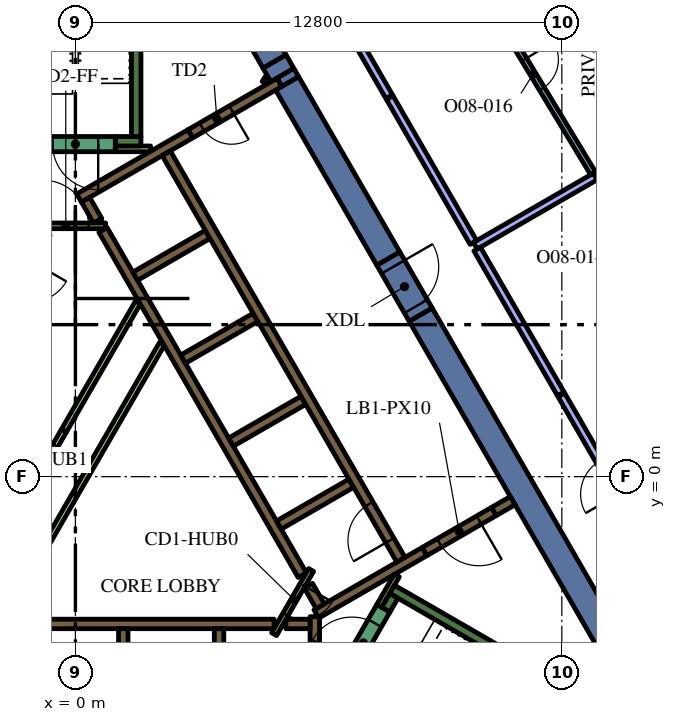
"""IFC4 building model, lengths in metres.
Left out: names, types, materials, properties, quantities, classifications, styles, units other than length and angle.
Written with IfcOpenShell. Run it as: python <this file> out.ifc"""

import sys

from ifc_helpers import new_model, si_unit, direction, frame, frame_2d, origin, place, context, subcontext, project, spatial, polyline, rectangle, outline, extrude, element, fill, save


model = new_model("IFC4")
c1 = context("Model", 3, precision=1e-05, world=origin(), true_north=direction((0.0, 1.0)))
c2 = subcontext(c1, "Body", "Model", "MODEL_VIEW")
j1 = project(units=[si_unit("LENGTHUNIT", "METRE"), si_unit("PLANEANGLEUNIT", "RADIAN")], contexts=[c1])
p1 = place(None, origin())
s1 = spatial("IfcSite", under=j1, at=p1, CompositionType="ELEMENT")
p2 = place(p1, origin())
s2 = spatial("IfcBuilding", under=s1, at=p2, CompositionType="ELEMENT")
p3 = place(p2, frame((0.0, 0.0, 226.8)))
s3 = spatial("IfcBuildingStorey", under=s2, at=p3, CompositionType="ELEMENT", Elevation=226.8)
p4 = place(p3, frame((9.085, 4.264, 0.0), z_axis=(0.0, 0.0, 1.0), x_axis=(0.499998082512, -0.866026510844, 0.0)))
e1 = element("IfcWall", 1, at=p4, inside=s3, PredefinedType="SOLIDWALL", context=c2, shape_type="SweptSolid", body=[
    extrude(rectangle(XDim=12.472, YDim=0.7, at=frame_2d((6.236, 0.0))), origin(), (0.0, 0.0, 1.0), 4.2),
])
p5 = place(p3, frame((5.445, 10.569, 0.0), z_axis=(0.0, 0.0, 1.0), x_axis=(-0.500218351069, 0.865899302029, 0.0)))
e2 = element("IfcWall", 2, at=p5, inside=s3, PredefinedType="SOLIDWALL", context=c2, shape_type="SweptSolid", body=[
    extrude(rectangle(XDim=0.412, YDim=0.7, at=frame_2d((0.206, 0.0))), origin(), (0.0, 0.0, 1.0), 4.2),
])
p6 = place(p3, frame((5.571, 10.35, 0.0), z_axis=(0.0, 0.0, 1.0), x_axis=(0.499968379186, -0.8660436593, 0.0)))
e3 = element("IfcWall", 3, at=p6, inside=s3, PredefinedType="SOLIDWALL", context=c2, shape_type="SweptSolid", body=[
    extrude(rectangle(XDim=5.328, YDim=0.7, at=frame_2d((2.664, 0.0))), origin(), (0.0, 0.0, 1.0), 4.2),
])
p7 = place(p3, origin())
e4 = element("IfcWall", 4, at=p7, inside=s3, PredefinedType="SOLIDWALL", context=c2, shape_type="SweptSolid", body=[
    extrude(outline(polyline([(5.432, 10.272), (5.308, 10.487), (5.749, 10.742), (5.873, 10.527), (5.432, 10.272)])), origin(), (0.0, 0.0, 1.0), 4.2),
])
p8 = place(p3, frame((5.238, 10.927, 0.0), z_axis=(0.0, 0.0, 1.0), x_axis=(-0.499985607887, 0.866033712915, 0.0)))
e5 = element("IfcWall", 5, at=p8, inside=s3, PredefinedType="SOLIDWALL", context=c2, shape_type="SweptSolid", body=[
    extrude(rectangle(XDim=6.478, YDim=0.7, at=frame_2d((3.239, 0.0))), origin(), (0.0, 0.0, 1.0), 4.2),
])
p9 = place(p3, frame((8.334, -2.964, 0.0), z_axis=(0.0, 0.0, 1.0), x_axis=(0.866016039709, -0.500016218704, 0.0)))
e6 = element("IfcWall", 6, at=p9, inside=s3, PredefinedType="SOLIDWALL", context=c2, shape_type="SweptSolid", body=[
    extrude(rectangle(XDim=7.05, YDim=0.25, at=frame_2d((3.525, 0.0))), origin(), (0.0, 0.0, 1.0), 4.2),
])
p10 = place(p3, frame((8.168, -3.503, 0.0), z_axis=(0.0, 0.0, 1.0), x_axis=(0.49972245349, 0.866185586049, 0.0)))
e7 = element("IfcWall", 7, at=p10, inside=s3, PredefinedType="SOLIDWALL", context=c2, shape_type="SweptSolid", body=[
    extrude(rectangle(XDim=0.425, YDim=0.25, at=frame_2d((0.212, 0.0))), origin(), (0.0, 0.0, 1.0), 4.2),
])
p11 = place(p3, frame((1.6, 8.95, 0.0), z_axis=(0.0, 0.0, 1.0), x_axis=(0.0, 1.0, 0.0)))
e8 = element("IfcWall", 8, at=p11, inside=s3, PredefinedType="SOLIDWALL", context=c2, shape_type="SweptSolid", body=[
    extrude(rectangle(XDim=6.8, YDim=0.25, at=frame_2d((3.4, 0.0))), origin(), (0.0, 0.0, 1.0), 4.2),
])
p12 = place(p3, frame((1.05, 8.825, 0.0), z_axis=(0.0, 0.0, 1.0), x_axis=(1.0, 0.0, 0.0)))
e9 = element("IfcWall", 9, at=p12, inside=s3, PredefinedType="SOLIDWALL", context=c2, shape_type="SweptSolid", body=[
    extrude(rectangle(XDim=0.675, YDim=0.25, at=frame_2d((0.337, 0.0))), origin(), (0.0, 0.0, 1.0), 4.2),
])
p13 = place(p3, frame((-5.259, -3.875, 0.0), z_axis=(0.0, 0.0, 1.0), x_axis=(1.0, 0.0, 0.0)))
e10 = element("IfcWall", 10, at=p13, inside=s3, PredefinedType="SOLIDWALL", context=c2, shape_type="SweptSolid", body=[
    extrude(rectangle(XDim=10.489, YDim=0.25, at=frame_2d((5.244, 0.0))), origin(), (0.0, 0.0, 1.0), 4.2),
])
for number, where, z_axis, x_axis in (
    (11, (3.78, -4.0, 0.0), (0.0, 0.0, 1.0), (0.0, -1.0, 0.0)),
    (12, (1.26, -4.0, 0.0), (0.0, 0.0, 1.0), (0.0, -1.0, 0.0)),
):
    element("IfcWall", number, at=place(p3, frame(where, z_axis=z_axis, x_axis=x_axis)), inside=s3, PredefinedType="SOLIDWALL", context=c2, shape_type="SweptSolid", body=[
        extrude(rectangle(XDim=2.2, YDim=0.25, at=frame_2d((1.1, 0.0))), origin(), (0.0, 0.0, 1.0), 4.2),
    ])
p14 = place(p3, frame((6.3, -7.24, 0.0), z_axis=(0.0, 0.0, 1.0), x_axis=(0.0, 1.0, 0.0)))
e13 = element("IfcWall", 13, at=p14, inside=s3, PredefinedType="SOLIDWALL", context=c2, shape_type="SweptSolid", body=[
    extrude(rectangle(XDim=3.556, YDim=0.25, at=frame_2d((1.778, 0.0))), origin(), (0.0, 0.0, 1.0), 4.2),
])
p15 = place(p3, frame((5.538, -3.875, 0.0), z_axis=(0.0, 0.0, 1.0), x_axis=(1.0, 0.0, 0.0)))
e14 = element("IfcWall", 14, at=p15, inside=s3, PredefinedType="SOLIDWALL", context=c2, shape_type="SweptSolid", body=[
    extrude(rectangle(XDim=0.637, YDim=0.25, at=frame_2d((0.318, 0.0))), origin(), (0.0, 0.0, 1.0), 4.2),
])
p16 = place(p3, frame((9.19, -1.969, 0.0), z_axis=(0.0, 0.0, 1.0), x_axis=(-0.866057109641, -0.499945079824, 0.0)))
e15 = element("IfcWall", 15, at=p16, inside=s3, PredefinedType="SOLIDWALL", context=c2, shape_type="SweptSolid", body=[
    extrude(rectangle(XDim=3.291, YDim=0.25, at=frame_2d((1.646, 0.0))), origin(), (0.0, 0.0, 1.0), 4.2),
])
p17 = place(p3, frame((6.13, -2.867, 0.0), z_axis=(0.0, 0.0, 1.0), x_axis=(0.500160776593, -0.865932559475, 0.0)))
e16 = element("IfcWall", 16, at=p17, inside=s3, PredefinedType="SOLIDWALL", context=c2, shape_type="SweptSolid", body=[
    extrude(rectangle(XDim=0.627, YDim=0.25, at=frame_2d((0.313, 0.0))), origin(), (0.0, 0.0, 1.0), 4.2),
])
p18 = place(p3, frame((11.507, -0.631, 0.0), z_axis=(0.0, 0.0, 1.0), x_axis=(-0.866093731455, -0.499881634324, 0.0)))
e17 = element("IfcWall", 17, at=p18, inside=s3, PredefinedType="SOLIDWALL", context=c2, shape_type="SweptSolid", body=[
    extrude(rectangle(XDim=0.575, YDim=0.25, at=frame_2d((0.288, 0.0))), origin(), (0.0, 0.0, 1.0), 4.2),
])
p19 = place(p3, frame((3.028, 9.023, 0.0), z_axis=(0.0, 0.0, 1.0), x_axis=(-0.866036587186, -0.49998062928, 0.0)))
e18 = element("IfcWall", 18, at=p19, inside=s3, PredefinedType="SOLIDWALL", context=c2, shape_type="SweptSolid", body=[
    extrude(rectangle(XDim=3.384, YDim=0.25, at=frame_2d((1.692, 0.0))), origin(), (0.0, 0.0, 1.0), 4.2),
])
p20 = place(p3, frame((0.268, 7.285, 0.0), z_axis=(0.0, 0.0, 1.0), x_axis=(0.500098681536, -0.865968422476, 0.0)))
e19 = element("IfcWall", 19, at=p20, inside=s3, PredefinedType="SOLIDWALL", context=c2, shape_type="SweptSolid", body=[
    extrude(rectangle(XDim=0.636, YDim=0.25, at=frame_2d((0.318, 0.0))), origin(), (0.0, 0.0, 1.0), 4.2),
])
p21 = place(p3, frame((5.97, -2.591, 0.0), z_axis=(0.0, 0.0, 1.0), x_axis=(-0.499994469932, 0.866028596547, 0.0)))
e20 = element("IfcWall", 20, at=p21, inside=s3, PredefinedType="SOLIDWALL", context=c2, shape_type="SweptSolid", body=[
    extrude(rectangle(XDim=10.488, YDim=0.25, at=frame_2d((5.244, 0.0))), origin(), (0.0, 0.0, 1.0), 4.2),
])
p22 = place(p3, frame((1.574, 5.274, 0.0), z_axis=(0.0, 0.0, 1.0), x_axis=(0.866028486751, 0.499994660107, 0.0)))
e21 = element("IfcWall", 21, at=p22, inside=s3, PredefinedType="SOLIDWALL", context=c2, shape_type="SweptSolid", body=[
    extrude(rectangle(XDim=2.2, YDim=0.25, at=frame_2d((1.1, 0.0))), origin(), (0.0, 0.0, 1.0), 4.2),
])
for number, where, z_axis, x_axis in (
    (22, (2.834, 3.091, 0.0), (0.0, 0.0, 1.0), (0.866, 0.5, 0.0)),
    (23, (4.094, 0.909, 0.0), (0.0, 0.0, 1.0), (0.866, 0.5, 0.0)),
    (24, (5.354, -1.274, 0.0), (0.0, 0.0, 1.0), (0.866, 0.5, 0.0)),
):
    element("IfcWall", number, at=place(p3, frame(where, z_axis=z_axis, x_axis=x_axis)), inside=s3, PredefinedType="SOLIDWALL", context=c2, shape_type="SweptSolid", body=[
        extrude(rectangle(XDim=2.2, YDim=0.25, at=frame_2d((1.1, 0.0))), origin(), (0.0, 0.0, 1.0), 4.2),
    ])
p23 = place(p3, frame((1.05, 8.625, 0.0), z_axis=(0.0, 0.0, 1.0), x_axis=(1.0, 0.0, 0.0)))
e25 = element("IfcWall", 25, at=p23, inside=s3, PredefinedType="PARTITIONING", context=c2, shape_type="SweptSolid", body=[
    extrude(rectangle(XDim=0.929, YDim=0.15, at=frame_2d((0.464, 0.0))), origin(), (0.0, 0.0, 1.0), 3.45),
])
p24 = place(p3, frame((4.98, 10.358, 0.0), z_axis=(0.0, 0.0, 1.0), x_axis=(0.500640202437, 0.86565546709, 0.0)))
e26 = element("IfcWall", 26, at=p24, inside=s3, PredefinedType="PARTITIONING", context=c2, shape_type="SweptSolid", body=[
    extrude(rectangle(XDim=0.146, YDim=0.15, at=frame_2d((0.073, 0.0))), origin(), (0.0, 0.0, 1.0), 3.45),
])
p25 = place(p3, frame((8.459, -2.599, 0.0), z_axis=(0.0, 0.0, 1.0), x_axis=(-0.500041054325, -0.866001699761, 0.0)))
e27 = element("IfcWall", 27, at=p25, inside=s3, PredefinedType="PARTITIONING", context=c2, shape_type="SweptSolid", body=[
    extrude(rectangle(XDim=0.929, YDim=0.15, at=frame_2d((0.464, 0.0))), origin(), (0.0, 0.0, 1.0), 4.2),
])
p26 = place(p3, frame((-1.887, -3.718, 0.0), z_axis=(0.0, 0.0, 1.0), x_axis=(0.500005008002, 0.866022512394, 0.0)))
e28 = element("IfcWall", 28, at=p26, inside=s3, PredefinedType="PARTITIONING", context=c2, shape_type="SweptSolid", body=[
    extrude(rectangle(XDim=8.327, YDim=0.15, at=frame_2d((4.164, 0.0))), origin(), (0.0, 0.0, 1.0), 3.45),
])
p27 = place(p3, frame((-0.3, 1.212, 0.0), z_axis=(0.0, 0.0, 1.0), x_axis=(0.499963101113, 0.866046706318, 0.0)))
e29 = element("IfcWall", 29, at=p27, inside=s3, PredefinedType="PARTITIONING", context=c2, shape_type="SweptSolid", body=[
    extrude(rectangle(XDim=3.893, YDim=0.15, at=frame_2d((1.947, 0.0))), origin(), (0.0, 0.0, 1.0), 3.45),
])
p28 = place(p3, frame((8.565, -2.185, 0.0), z_axis=(0.0, 0.0, 1.0), x_axis=(-0.499997954832, 0.866026584559, 0.0)))
e30 = element("IfcWall", 30, at=p28, inside=s3, PredefinedType="SOLIDWALL", context=c2, shape_type="SweptSolid", body=[
    extrude(rectangle(XDim=12.35, YDim=0.25, at=frame_2d((6.175, 0.0))), origin(), (0.0, 0.0, 1.0), 4.2),
])
p29 = place(p28, frame((0.585, 0.0, 0.0)))
e31 = element("IfcOpeningElement", 31, at=p29, cuts=e30, PredefinedType="OPENING", context=c2, shape_type="SweptSolid", body=[
    extrude(rectangle(XDim=1.1, YDim=2.1, at=frame_2d((0.55, 1.05))), frame((0.0, 0.135, 0.0), z_axis=(0.0, -1.0, 0.0), x_axis=(1.0, 0.0, 0.0)), (0.0, 0.0, 1.0), 0.27),
])
p30 = place(p3, frame((7.053, -5.284, 0.0), z_axis=(0.0, 0.0, 1.0), x_axis=(0.500078061341, 0.865980330357, 0.0)))
e32 = element("IfcWall", 32, at=p30, inside=s3, PredefinedType="SOLIDWALL", context=c2, shape_type="SweptSolid", body=[
    extrude(rectangle(XDim=2.1, YDim=0.4, at=frame_2d((1.05, 0.0))), origin(), (0.0, 0.0, 1.0), 4.2),
])
p31 = place(p30, frame((0.45, 0.0, 0.0)))
e33 = element("IfcOpeningElement", 33, at=p31, cuts=e32, PredefinedType="OPENING", context=c2, shape_type="SweptSolid", body=[
    extrude(rectangle(XDim=1.2, YDim=2.1, at=frame_2d((0.6, 1.05))), frame((0.0, 0.21, 0.0), z_axis=(0.0, -1.0, 0.0), x_axis=(1.0, 0.0, 0.0)), (0.0, 0.0, 1.0), 0.42),
])
p32 = place(p3, frame((1.05, 8.75, 0.0), z_axis=(0.0, 0.0, 1.0), x_axis=(-1.0, 0.0, 0.0)))
e34 = element("IfcWall", 34, at=p32, inside=s3, PredefinedType="SOLIDWALL", context=c2, shape_type="SweptSolid", body=[
    extrude(rectangle(XDim=2.1, YDim=0.4, at=frame_2d((1.05, 0.0))), origin(), (0.0, 0.0, 1.0), 4.2),
])
p33 = place(p32, frame((0.45, 0.0, 0.0)))
e35 = element("IfcOpeningElement", 35, at=p33, cuts=e34, PredefinedType="OPENING", context=c2, shape_type="SweptSolid", body=[
    extrude(rectangle(XDim=1.2, YDim=2.1, at=frame_2d((0.6, 1.05))), frame((0.0, 0.21, 0.0), z_axis=(0.0, -1.0, 0.0), x_axis=(1.0, 0.0, 0.0)), (0.0, 0.0, 1.0), 0.42),
])
p34 = place(p3, frame((5.366, 10.373, 0.0), z_axis=(0.0, 0.0, 1.0), x_axis=(-0.866019956843, -0.50000943426, 0.0)))
e36 = element("IfcWall", 36, at=p34, inside=s3, PredefinedType="SOLIDWALL", context=c2, shape_type="SweptSolid", body=[
    extrude(rectangle(XDim=2.7, YDim=0.25, at=frame_2d((1.35, 0.0))), origin(), (0.0, 0.0, 1.0), 4.2),
])
p35 = place(p34, frame((1.45, 0.0, 0.0)))
e37 = element("IfcOpeningElement", 37, at=p35, cuts=e36, PredefinedType="OPENING", context=c2, shape_type="SweptSolid", body=[
    extrude(rectangle(XDim=0.9, YDim=2.1, at=frame_2d((0.45, 1.05))), frame((0.0, 0.135, 0.0), z_axis=(0.0, -1.0, 0.0), x_axis=(1.0, 0.0, 0.0)), (0.0, 0.0, 1.0), 0.27),
])
p36 = place(p3, frame((6.203, -2.456, 0.0), z_axis=(0.0, 0.0, 1.0), x_axis=(-0.500043961785, -0.866000020948, 0.0)))
e38 = element("IfcWall", 38, at=p36, inside=s3, PredefinedType="PARTITIONING", context=c2, shape_type="SweptSolid", body=[
    extrude(rectangle(XDim=1.95, YDim=0.15, at=frame_2d((0.975, 0.0))), origin(), (0.0, 0.0, 1.0), 4.2),
])
p37 = place(p36, frame((0.45, 0.0, 0.0)))
e39 = element("IfcOpeningElement", 39, at=p37, cuts=e38, PredefinedType="OPENING", context=c2, shape_type="SweptSolid", body=[
    extrude(rectangle(XDim=0.9, YDim=2.1, at=frame_2d((0.45, 1.05))), frame((0.0, 0.085, 0.0), z_axis=(0.0, -1.0, 0.0), x_axis=(1.0, 0.0, 0.0)), (0.0, 0.0, 1.0), 0.17),
])
p38 = place(p3, frame((-1.303, 6.6, 0.0), z_axis=(0.0, 0.0, 1.0), x_axis=(1.0, 0.0, 0.0)))
e40 = element("IfcWall", 40, at=p38, inside=s3, PredefinedType="PARTITIONING", context=c2, shape_type="SweptSolid", body=[
    extrude(rectangle(XDim=2.1, YDim=0.15, at=frame_2d((1.05, 0.0))), origin(), (0.0, 0.0, 1.0), 4.2),
])
p39 = place(p38, frame((0.45, 0.0, 0.0)))
e41 = element("IfcOpeningElement", 41, at=p39, cuts=e40, PredefinedType="OPENING", context=c2, shape_type="SweptSolid", body=[
    extrude(rectangle(XDim=1.2, YDim=2.1, at=frame_2d((0.6, 1.05))), frame((0.0, 0.085, 0.0), z_axis=(0.0, -1.0, 0.0), x_axis=(1.0, 0.0, 0.0)), (0.0, 0.0, 1.0), 0.17),
])
p40 = place(p3, frame((11.009, -0.919, 0.0), z_axis=(0.0, 0.0, 1.0), x_axis=(-0.866059744384, -0.49994051562, 0.0)))
e42 = element("IfcWall", 42, at=p40, inside=s3, PredefinedType="SOLIDWALL", context=c2, shape_type="SweptSolid", body=[
    extrude(rectangle(XDim=2.1, YDim=0.25, at=frame_2d((1.05, 0.0))), origin(), (0.0, 0.0, 1.0), 4.2),
])
p41 = place(p40, frame((0.45, 0.0, 0.0)))
e43 = element("IfcOpeningElement", 43, at=p41, cuts=e42, PredefinedType="OPENING", context=c2, shape_type="SweptSolid", body=[
    extrude(rectangle(XDim=1.2, YDim=2.1, at=frame_2d((0.6, 1.05))), frame((0.0, 0.135, 0.0), z_axis=(0.0, -1.0, 0.0), x_axis=(1.0, 0.0, 0.0)), (0.0, 0.0, 1.0), 0.27),
])
p42 = place(p3, frame((8.235, 5.736, 0.0), z_axis=(0.0, 0.0, 1.0), x_axis=(0.499954529098, -0.86605165483, 0.0)))
e44 = element("IfcWall", 44, at=p42, inside=s3, PredefinedType="SOLIDWALL", context=c2, shape_type="SweptSolid", body=[
    extrude(rectangle(XDim=1.7, YDim=0.7, at=frame_2d((0.85, 0.0))), origin(), (0.0, 0.0, 1.0), 4.2),
])
p43 = place(p42, frame((0.25, 0.0, 0.0)))
e45 = element("IfcOpeningElement", 45, at=p43, cuts=e44, PredefinedType="OPENING", context=c2, shape_type="SweptSolid", body=[
    extrude(rectangle(XDim=1.2, YDim=2.1, at=frame_2d((0.6, 1.05))), frame((0.0, 0.36, 0.0), z_axis=(0.0, -1.0, 0.0), x_axis=(1.0, 0.0, 0.0)), (0.0, 0.0, 1.0), 0.72),
])
p44 = place(p3, frame((-1.2, -0.346, 0.0), z_axis=(0.0, 0.0, 1.0), x_axis=(0.499961193289, 0.866047807691, 0.0)))
e46 = element("IfcWall", 46, at=p44, inside=s3, PredefinedType="PARTITIONING", context=c2, shape_type="SweptSolid", body=[
    extrude(rectangle(XDim=1.8, YDim=0.15, at=frame_2d((0.9, 0.0))), origin(), (0.0, 0.0, 1.0), 3.45),
])
p45 = place(p44, frame((0.45, 0.0, 0.0)))
e47 = element("IfcOpeningElement", 47, at=p45, cuts=e46, PredefinedType="OPENING", context=c2, shape_type="SweptSolid", body=[
    extrude(rectangle(XDim=0.9, YDim=2.1, at=frame_2d((0.45, 1.05))), frame((0.0, 0.085, 0.0), z_axis=(0.0, -1.0, 0.0), x_axis=(1.0, 0.0, 0.0)), (0.0, 0.0, 1.0), 0.17),
])
p46 = place(p3, frame((10.522, 6.075, 0.0), z_axis=(0.0, 0.0, 1.0), x_axis=(0.866003708037, 0.500037576254, 0.0)))
e48 = element("IfcWall", 48, at=p46, inside=s3, PredefinedType="PARTITIONING", context=c2, shape_type="SweptSolid", body=[
    extrude(rectangle(XDim=3.644, YDim=0.2, at=frame_2d((1.822, 0.0))), origin(), (0.0, 0.0, 1.0), 3.45),
])
p47 = place(p3, frame((12.772, 2.178, 0.0), z_axis=(0.0, 0.0, 1.0), x_axis=(-0.50001224981, 0.866018331238, 0.0)))
e49 = element("IfcWall", 49, at=p47, inside=s3, PredefinedType="PARTITIONING", context=c2, shape_type="SweptSolid", body=[
    extrude(rectangle(XDim=4.4, YDim=0.2, at=frame_2d((2.2, 0.0))), origin(), (0.0, 0.0, 1.0), 3.45),
])
p48 = place(p3, frame((15.295, -2.191, 0.0), z_axis=(0.0, 0.0, 1.0), x_axis=(-0.500039923732, 0.86600235258, 0.0)))
e50 = element("IfcWall", 50, at=p48, inside=s3, PredefinedType="PARTITIONING", context=c2, shape_type="SweptSolid", body=[
    extrude(rectangle(XDim=5.015, YDim=0.2, at=frame_2d((2.507, 0.0))), origin(), (0.0, 0.0, 1.0), 3.45),
])
p49 = place(p48, frame((2.0, 0.0, 0.0)))
e51 = element("IfcOpeningElement", 51, at=p49, cuts=e50, PredefinedType="OPENING", context=c2, shape_type="SweptSolid", body=[
    extrude(rectangle(XDim=1.0, YDim=2.1, at=frame_2d((0.5, 1.05))), frame((0.0, 0.11, 0.0), z_axis=(0.0, -1.0, 0.0), x_axis=(1.0, 0.0, 0.0)), (0.0, 0.0, 1.0), 0.22),
])
p50 = place(p3, frame((10.439, 13.24, 0.0), z_axis=(0.0, 0.0, 1.0), x_axis=(0.517837859082, -0.855478785068, 0.0)))
e52 = element("IfcWall", 52, at=p50, inside=s3, PredefinedType="PARTITIONING", context=c2, shape_type="SweptSolid", body=[
    extrude(rectangle(XDim=6.148, YDim=0.15, at=frame_2d((3.074, 0.0))), origin(), (0.0, 0.0, 1.0), 3.45),
])
p51 = place(p50, frame((2.648, 0.0, 0.0)))
e53 = element("IfcOpeningElement", 53, at=p51, cuts=e52, PredefinedType="OPENING", context=c2, shape_type="SweptSolid", body=[
    extrude(rectangle(XDim=0.9, YDim=2.1, at=frame_2d((0.45, 1.05))), frame((0.0, 0.085, 0.0), z_axis=(0.0, -1.0, 0.0), x_axis=(1.0, 0.0, 0.0)), (0.0, 0.0, 1.0), 0.17),
])
p52 = place(p3, frame((10.472, 6.162, 0.0), z_axis=(0.0, 0.0, 1.0), x_axis=(-0.499988222896, 0.866032203192, 0.0)))
e54 = element("IfcWall", 54, at=p52, inside=s3, PredefinedType="PARTITIONING", context=c2, shape_type="SweptSolid", body=[
    extrude(rectangle(XDim=4.4, YDim=0.2, at=frame_2d((2.2, 0.0))), origin(), (0.0, 0.0, 1.0), 3.45),
])
p53 = place(p3, frame((8.257, 9.998, 0.0), z_axis=(0.0, 0.0, 1.0), x_axis=(-0.499987955211, 0.866032357735, 0.0)))
e55 = element("IfcWall", 55, at=p53, inside=s3, PredefinedType="PARTITIONING", context=c2, shape_type="SweptSolid", body=[
    extrude(rectangle(XDim=9.817, YDim=0.2, at=frame_2d((4.909, 0.0))), origin(), (0.0, 0.0, 1.0), 3.45),
])
p54 = place(p53, frame((4.4, 0.0, 0.0)))
e56 = element("IfcOpeningElement", 56, at=p54, cuts=e55, PredefinedType="OPENING", context=c2, shape_type="SweptSolid", body=[
    extrude(rectangle(XDim=1.0, YDim=2.1, at=frame_2d((0.5, 1.05))), frame((0.0, 0.11, 0.0), z_axis=(0.0, -1.0, 0.0), x_axis=(1.0, 0.0, 0.0)), (0.0, 0.0, 1.0), 0.22),
])
p55 = place(p29, origin())
e57 = element("IfcDoor", 57, at=p55, inside=s3, OperationType="DOUBLE_DOOR_SLIDING", PredefinedType="DOOR", context=c2, shape_type="SweptSolid", body=[
    extrude(rectangle(XDim=1.1, YDim=2.1, at=frame_2d((0.55, 1.05))), frame((0.0, 0.025, 0.0), z_axis=(0.0, -1.0, 0.0), x_axis=(1.0, 0.0, 0.0)), (0.0, 0.0, 1.0), 0.05),
])
fill(e31, e57)
p56 = place(p31, origin())
e58 = element("IfcDoor", 58, at=p56, inside=s3, OperationType="SINGLE_SWING_LEFT", PredefinedType="DOOR", context=c2, shape_type="SweptSolid", body=[
    extrude(rectangle(XDim=1.2, YDim=2.1, at=frame_2d((0.6, 1.05))), frame((0.0, 0.025, 0.0), z_axis=(0.0, -1.0, 0.0), x_axis=(1.0, 0.0, 0.0)), (0.0, 0.0, 1.0), 0.05),
])
fill(e33, e58)
p57 = place(p33, origin())
e59 = element("IfcDoor", 59, at=p57, inside=s3, OperationType="SINGLE_SWING_LEFT", PredefinedType="DOOR", context=c2, shape_type="SweptSolid", body=[
    extrude(rectangle(XDim=1.2, YDim=2.1, at=frame_2d((0.6, 1.05))), frame((0.0, 0.025, 0.0), z_axis=(0.0, -1.0, 0.0), x_axis=(1.0, 0.0, 0.0)), (0.0, 0.0, 1.0), 0.05),
])
fill(e35, e59)
p58 = place(p35, origin())
e60 = element("IfcDoor", 60, at=p58, inside=s3, OperationType="SINGLE_SWING_LEFT", PredefinedType="DOOR", context=c2, shape_type="SweptSolid", body=[
    extrude(rectangle(XDim=0.9, YDim=2.1, at=frame_2d((0.45, 1.05))), frame((0.0, 0.025, 0.0), z_axis=(0.0, -1.0, 0.0), x_axis=(1.0, 0.0, 0.0)), (0.0, 0.0, 1.0), 0.05),
])
fill(e37, e60)
p59 = place(p37, origin())
e61 = element("IfcDoor", 61, at=p59, inside=s3, OperationType="SINGLE_SWING_LEFT", PredefinedType="DOOR", context=c2, shape_type="SweptSolid", body=[
    extrude(rectangle(XDim=0.9, YDim=2.1, at=frame_2d((0.45, 1.05))), frame((0.0, 0.025, 0.0), z_axis=(0.0, -1.0, 0.0), x_axis=(1.0, 0.0, 0.0)), (0.0, 0.0, 1.0), 0.05),
])
fill(e39, e61)
p60 = place(p39, origin())
e62 = element("IfcDoor", 62, at=p60, inside=s3, OperationType="SINGLE_SWING_LEFT", PredefinedType="DOOR", context=c2, shape_type="SweptSolid", body=[
    extrude(rectangle(XDim=1.2, YDim=2.1, at=frame_2d((0.6, 1.05))), frame((0.0, 0.025, 0.0), z_axis=(0.0, -1.0, 0.0), x_axis=(1.0, 0.0, 0.0)), (0.0, 0.0, 1.0), 0.05),
])
fill(e41, e62)
p61 = place(p41, origin())
e63 = element("IfcDoor", 63, at=p61, inside=s3, OperationType="SINGLE_SWING_LEFT", PredefinedType="DOOR", context=c2, shape_type="SweptSolid", body=[
    extrude(rectangle(XDim=1.2, YDim=2.1, at=frame_2d((0.6, 1.05))), frame((0.0, 0.025, 0.0), z_axis=(0.0, -1.0, 0.0), x_axis=(1.0, 0.0, 0.0)), (0.0, 0.0, 1.0), 0.05),
])
fill(e43, e63)
p62 = place(p43, origin())
e64 = element("IfcDoor", 64, at=p62, inside=s3, OperationType="SINGLE_SWING_LEFT", PredefinedType="DOOR", context=c2, shape_type="SweptSolid", body=[
    extrude(rectangle(XDim=1.2, YDim=2.1, at=frame_2d((0.6, 1.05))), frame((0.0, 0.025, 0.0), z_axis=(0.0, -1.0, 0.0), x_axis=(1.0, 0.0, 0.0)), (0.0, 0.0, 1.0), 0.05),
])
fill(e45, e64)
p63 = place(p45, origin())
e65 = element("IfcDoor", 65, at=p63, inside=s3, OperationType="SINGLE_SWING_LEFT", PredefinedType="DOOR", context=c2, shape_type="SweptSolid", body=[
    extrude(rectangle(XDim=0.9, YDim=2.1, at=frame_2d((0.45, 1.05))), frame((0.0, 0.025, 0.0), z_axis=(0.0, -1.0, 0.0), x_axis=(1.0, 0.0, 0.0)), (0.0, 0.0, 1.0), 0.05),
])
fill(e47, e65)
p64 = place(p51, origin())
e66 = element("IfcDoor", 66, at=p64, inside=s3, OperationType="SINGLE_SWING_RIGHT", PredefinedType="DOOR", context=c2, shape_type="SweptSolid", body=[
    extrude(rectangle(XDim=0.9, YDim=2.1, at=frame_2d((0.45, 1.05))), frame((0.0, 0.025, 0.0), z_axis=(0.0, -1.0, 0.0), x_axis=(1.0, 0.0, 0.0)), (0.0, 0.0, 1.0), 0.05),
])
fill(e53, e66)
save(model, sys.argv[1])
